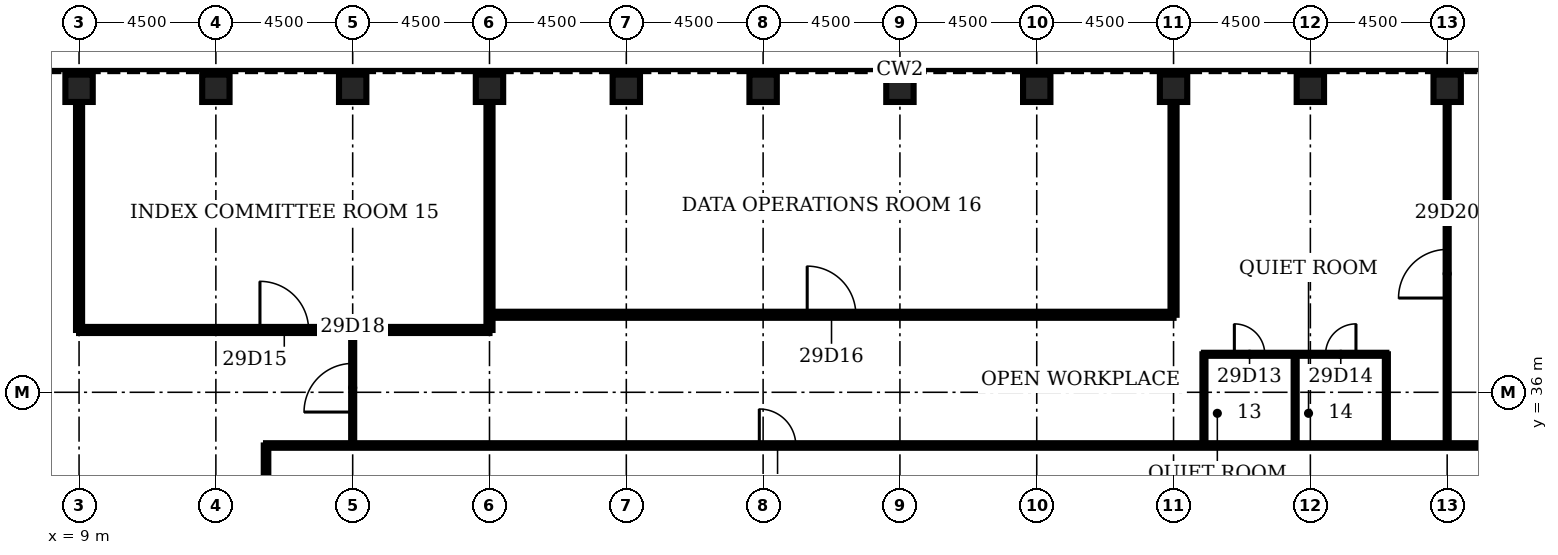
"""IFC4 building model, lengths in metres.
Left out: names, types, materials, properties, quantities, classifications, styles, units other than length and angle.
Written with IfcOpenShell. Run it as: python <this file> out.ifc"""

import sys

from ifc_helpers import new_model, si_unit, direction, frame, frame_2d, origin, origin_2d, place, context, subcontext, project, spatial, rectangle, hollow_rectangle, extrude, element, fill, save


model = new_model("IFC4")
c1 = context("Model", 3, precision=1e-05, world=origin(), true_north=direction((0.0, 1.0)))
c2 = subcontext(c1, "Body", "Model", "MODEL_VIEW")
j1 = project(units=[si_unit("LENGTHUNIT", "METRE"), si_unit("PLANEANGLEUNIT", "RADIAN")], contexts=[c1])
p1 = place(None, origin())
s1 = spatial("IfcSite", under=j1, at=p1, CompositionType="ELEMENT")
p2 = place(p1, origin())
s2 = spatial("IfcBuilding", under=s1, at=p2, CompositionType="ELEMENT")
p3 = place(p2, frame((0.0, 0.0, 134.1)))
s3 = spatial("IfcBuildingStorey", under=s2, at=p3, CompositionType="ELEMENT", Elevation=134.1)
for number, where, z_axis, x_axis in (
    (1, (54.0, 46.0, 0.0), (0.0, 0.0, 1.0), (0.0, 1.0, 0.0)),
    (2, (49.5, 46.0, 0.0), (0.0, 0.0, 1.0), (0.0, 1.0, 0.0)),
    (3, (45.0, 46.0, 0.0), (0.0, 0.0, 1.0), (0.0, 1.0, 0.0)),
    (4, (40.5, 46.0, 0.0), (0.0, 0.0, 1.0), (0.0, 1.0, 0.0)),
    (5, (36.0, 46.0, 0.0), (0.0, 0.0, 1.0), (0.0, 1.0, 0.0)),
    (6, (31.5, 46.0, 0.0), (0.0, 0.0, 1.0), (0.0, 1.0, 0.0)),
    (7, (27.0, 46.0, 0.0), (0.0, 0.0, 1.0), (0.0, 1.0, 0.0)),
    (8, (22.5, 46.0, 0.0), (0.0, 0.0, 1.0), (0.0, 1.0, 0.0)),
    (9, (18.0, 46.0, 0.0), (0.0, 0.0, 1.0), (0.0, 1.0, 0.0)),
    (10, (13.5, 46.0, 0.0), (0.0, 0.0, 1.0), (0.0, 1.0, 0.0)),
    (11, (9.0, 46.0, 0.0), (0.0, 0.0, 1.0), (0.0, 1.0, 0.0)),
):
    element("IfcColumn", number, at=place(p3, frame(where, z_axis=z_axis, x_axis=x_axis)), inside=s3, PredefinedType="COLUMN", context=c2, shape_type="SweptSolid", body=[
        extrude(hollow_rectangle(XDim=0.9, YDim=0.9, WallThickness=0.1, at=origin_2d()), origin(), (0.0, 0.0, 1.0), 4.2),
    ])
p4 = place(p3, frame((15.15, 34.25, 0.0), z_axis=(0.0, 0.0, 1.0), x_axis=(1.0, 0.0, 0.0)))
e12 = element("IfcWall", 12, at=p4, inside=s3, PredefinedType="PARTITIONING", context=c2, shape_type="SweptSolid", body=[
    extrude(rectangle(XDim=41.7, YDim=0.15, at=frame_2d((20.85, 0.0))), origin(), (0.0, 0.0, 1.0), 3.0),
])
p5 = place(p4, frame((16.225, 0.0, 0.0)))
e13 = element("IfcOpeningElement", 13, at=p5, cuts=e12, PredefinedType="OPENING", context=c2, shape_type="SweptSolid", body=[
    extrude(rectangle(XDim=1.2, YDim=2.1, at=frame_2d((0.6, 1.05))), frame((0.0, 0.085, 0.0), z_axis=(0.0, -1.0, 0.0), x_axis=(1.0, 0.0, 0.0)), (0.0, 0.0, 1.0), 0.17),
])
p6 = place(p3, frame((46.0, 37.25, 0.0), z_axis=(0.0, 0.0, 1.0), x_axis=(1.0, 0.0, 0.0)))
e14 = element("IfcWall", 14, at=p6, inside=s3, PredefinedType="PARTITIONING", context=c2, shape_type="SweptSolid", body=[
    extrude(rectangle(XDim=6.0, YDim=0.1, at=frame_2d((3.0, 0.0))), origin(), (0.0, 0.0, 1.0), 3.0),
])
p7 = place(p6, frame((1.0, 0.0, 0.0)))
e15 = element("IfcOpeningElement", 15, at=p7, cuts=e14, PredefinedType="OPENING", context=c2, shape_type="SweptSolid", body=[
    extrude(rectangle(XDim=1.0, YDim=2.1, at=frame_2d((0.5, 1.05))), frame((0.0, 0.06, 0.0), z_axis=(0.0, -1.0, 0.0), x_axis=(1.0, 0.0, 0.0)), (0.0, 0.0, 1.0), 0.12),
])
p8 = place(p6, frame((4.0, 0.0, 0.0)))
e16 = element("IfcOpeningElement", 16, at=p8, cuts=e14, PredefinedType="OPENING", context=c2, shape_type="SweptSolid", body=[
    extrude(rectangle(XDim=1.0, YDim=2.1, at=frame_2d((0.5, 1.05))), frame((0.0, 0.06, 0.0), z_axis=(0.0, -1.0, 0.0), x_axis=(1.0, 0.0, 0.0)), (0.0, 0.0, 1.0), 0.12),
])
p9 = place(p3, frame((9.0, 38.05, 0.0), z_axis=(0.0, 0.0, 1.0), x_axis=(1.0, 0.0, 0.0)))
e17 = element("IfcWall", 17, at=p9, inside=s3, PredefinedType="PARTITIONING", context=c2, shape_type="SweptSolid", body=[
    extrude(rectangle(XDim=13.5, YDim=0.2, at=frame_2d((6.75, 0.0))), origin(), (0.0, 0.0, 1.0), 3.0),
])
p10 = place(p9, frame((5.95, 0.0, 0.0)))
e18 = element("IfcOpeningElement", 18, at=p10, cuts=e17, PredefinedType="OPENING", context=c2, shape_type="SweptSolid", body=[
    extrude(rectangle(XDim=1.6, YDim=2.1, at=frame_2d((0.8, 1.05))), frame((0.0, 0.11, 0.0), z_axis=(0.0, -1.0, 0.0), x_axis=(1.0, 0.0, 0.0)), (0.0, 0.0, 1.0), 0.22),
])
p11 = place(p3, frame((22.5, 38.55, 0.0), z_axis=(0.0, 0.0, 1.0), x_axis=(1.0, 0.0, 0.0)))
e19 = element("IfcWall", 19, at=p11, inside=s3, PredefinedType="PARTITIONING", context=c2, shape_type="SweptSolid", body=[
    extrude(rectangle(XDim=22.5, YDim=0.2, at=frame_2d((11.25, 0.0))), origin(), (0.0, 0.0, 1.0), 3.0),
])
p12 = place(p11, frame((10.45, 0.0, 0.0)))
e20 = element("IfcOpeningElement", 20, at=p12, cuts=e19, PredefinedType="OPENING", context=c2, shape_type="SweptSolid", body=[
    extrude(rectangle(XDim=1.6, YDim=2.1, at=frame_2d((0.8, 1.05))), frame((0.0, 0.11, 0.0), z_axis=(0.0, -1.0, 0.0), x_axis=(1.0, 0.0, 0.0)), (0.0, 0.0, 1.0), 0.22),
])
p13 = place(p3, frame((9.0, 38.05, 0.0), z_axis=(0.0, 0.0, 1.0), x_axis=(0.0, 1.0, 0.0)))
e21 = element("IfcWall", 21, at=p13, inside=s3, PredefinedType="PARTITIONING", context=c2, shape_type="SweptSolid", body=[
    extrude(rectangle(XDim=7.5, YDim=0.2, at=frame_2d((3.75, 0.0))), origin(), (0.0, 0.0, 1.0), 3.0),
])
p14 = place(p3, frame((15.15, 13.75, 0.0), z_axis=(0.0, 0.0, 1.0), x_axis=(0.0, 1.0, 0.0)))
e22 = element("IfcWall", 22, at=p14, inside=s3, PredefinedType="PARTITIONING", context=c2, shape_type="SweptSolid", body=[
    extrude(rectangle(XDim=20.5, YDim=0.15, at=frame_2d((10.25, 0.0))), origin(), (0.0, 0.0, 1.0), 3.0),
])
p15 = place(p14, frame((9.65, 0.0, 0.0)))
e23 = element("IfcOpeningElement", 23, at=p15, cuts=e22, PredefinedType="OPENING", context=c2, shape_type="SweptSolid", body=[
    extrude(rectangle(XDim=1.2, YDim=2.1, at=frame_2d((0.6, 1.05))), frame((0.0, 0.085, 0.0), z_axis=(0.0, -1.0, 0.0), x_axis=(1.0, 0.0, 0.0)), (0.0, 0.0, 1.0), 0.17),
])
p16 = place(p3, frame((18.0, 34.25, 0.0), z_axis=(0.0, 0.0, 1.0), x_axis=(0.0, 1.0, 0.0)))
e24 = element("IfcWall", 24, at=p16, inside=s3, PredefinedType="PARTITIONING", context=c2, shape_type="SweptSolid", body=[
    extrude(rectangle(XDim=3.8, YDim=0.1, at=frame_2d((1.9, 0.0))), origin(), (0.0, 0.0, 1.0), 3.0),
])
p17 = place(p16, frame((1.1, 0.0, 0.0)))
e25 = element("IfcOpeningElement", 25, at=p17, cuts=e24, PredefinedType="OPENING", context=c2, shape_type="SweptSolid", body=[
    extrude(rectangle(XDim=1.6, YDim=2.1, at=frame_2d((0.8, 1.05))), frame((0.0, 0.06, 0.0), z_axis=(0.0, -1.0, 0.0), x_axis=(1.0, 0.0, 0.0)), (0.0, 0.0, 1.0), 0.12),
])
p18 = place(p3, frame((22.5, 38.05, 0.0), z_axis=(0.0, 0.0, 1.0), x_axis=(0.0, 1.0, 0.0)))
e26 = element("IfcWall", 26, at=p18, inside=s3, PredefinedType="PARTITIONING", context=c2, shape_type="SweptSolid", body=[
    extrude(rectangle(XDim=7.5, YDim=0.2, at=frame_2d((3.75, 0.0))), origin(), (0.0, 0.0, 1.0), 3.0),
])
p19 = place(p3, frame((45.0, 38.55, 0.0), z_axis=(0.0, 0.0, 1.0), x_axis=(0.0, 1.0, 0.0)))
e27 = element("IfcWall", 27, at=p19, inside=s3, PredefinedType="PARTITIONING", context=c2, shape_type="SweptSolid", body=[
    extrude(rectangle(XDim=7.0, YDim=0.2, at=frame_2d((3.5, 0.0))), origin(), (0.0, 0.0, 1.0), 3.0),
])
for number, where, z_axis, x_axis in (
    (28, (46.0, 34.25, 0.0), (0.0, 0.0, 1.0), (0.0, 1.0, 0.0)),
    (29, (49.0, 34.25, 0.0), (0.0, 0.0, 1.0), (0.0, 1.0, 0.0)),
    (30, (52.0, 34.25, 0.0), (0.0, 0.0, 1.0), (0.0, 1.0, 0.0)),
):
    element("IfcWall", number, at=place(p3, frame(where, z_axis=z_axis, x_axis=x_axis)), inside=s3, PredefinedType="PARTITIONING", context=c2, shape_type="SweptSolid", body=[
        extrude(rectangle(XDim=3.0, YDim=0.1, at=frame_2d((1.5, 0.0))), origin(), (0.0, 0.0, 1.0), 3.0),
    ])
p20 = place(p3, frame((54.0, 34.25, 0.0), z_axis=(0.0, 0.0, 1.0), x_axis=(0.0, 1.0, 0.0)))
e31 = element("IfcWall", 31, at=p20, inside=s3, PredefinedType="PARTITIONING", context=c2, shape_type="SweptSolid", body=[
    extrude(rectangle(XDim=11.3, YDim=0.1, at=frame_2d((5.65, 0.0))), origin(), (0.0, 0.0, 1.0), 3.0),
])
p21 = place(p20, frame((4.85, 0.0, 0.0)))
e32 = element("IfcOpeningElement", 32, at=p21, cuts=e31, PredefinedType="OPENING", context=c2, shape_type="SweptSolid", body=[
    extrude(rectangle(XDim=1.6, YDim=2.1, at=frame_2d((0.8, 1.05))), frame((0.0, 0.06, 0.0), z_axis=(0.0, -1.0, 0.0), x_axis=(1.0, 0.0, 0.0)), (0.0, 0.0, 1.0), 0.12),
])
p22 = place(p7, origin())
e33 = element("IfcDoor", 33, at=p22, inside=s3, OperationType="SINGLE_SWING_LEFT", PredefinedType="DOOR", context=c2, shape_type="SweptSolid", body=[
    extrude(rectangle(XDim=1.0, YDim=2.1, at=frame_2d((0.5, 1.05))), frame((0.0, 0.025, 0.0), z_axis=(0.0, -1.0, 0.0), x_axis=(1.0, 0.0, 0.0)), (0.0, 0.0, 1.0), 0.05),
])
fill(e15, e33)
p23 = place(p8, origin())
e34 = element("IfcDoor", 34, at=p23, inside=s3, OperationType="SINGLE_SWING_RIGHT", PredefinedType="DOOR", context=c2, shape_type="SweptSolid", body=[
    extrude(rectangle(XDim=1.0, YDim=2.1, at=frame_2d((0.5, 1.05))), frame((0.0, 0.025, 0.0), z_axis=(0.0, -1.0, 0.0), x_axis=(1.0, 0.0, 0.0)), (0.0, 0.0, 1.0), 0.05),
])
fill(e16, e34)
p24 = place(p10, origin())
e35 = element("IfcDoor", 35, at=p24, inside=s3, OperationType="SINGLE_SWING_LEFT", PredefinedType="DOOR", context=c2, shape_type="SweptSolid", body=[
    extrude(rectangle(XDim=1.6, YDim=2.1, at=frame_2d((0.8, 1.05))), frame((0.0, 0.025, 0.0), z_axis=(0.0, -1.0, 0.0), x_axis=(1.0, 0.0, 0.0)), (0.0, 0.0, 1.0), 0.05),
])
fill(e18, e35)
p25 = place(p12, origin())
e36 = element("IfcDoor", 36, at=p25, inside=s3, OperationType="SINGLE_SWING_LEFT", PredefinedType="DOOR", context=c2, shape_type="SweptSolid", body=[
    extrude(rectangle(XDim=1.6, YDim=2.1, at=frame_2d((0.8, 1.05))), frame((0.0, 0.025, 0.0), z_axis=(0.0, -1.0, 0.0), x_axis=(1.0, 0.0, 0.0)), (0.0, 0.0, 1.0), 0.05),
])
fill(e20, e36)
p26 = place(p17, origin())
e37 = element("IfcDoor", 37, at=p26, inside=s3, OperationType="SINGLE_SWING_LEFT", PredefinedType="DOOR", context=c2, shape_type="SweptSolid", body=[
    extrude(rectangle(XDim=1.6, YDim=2.1, at=frame_2d((0.8, 1.05))), frame((0.0, 0.025, 0.0), z_axis=(0.0, -1.0, 0.0), x_axis=(1.0, 0.0, 0.0)), (0.0, 0.0, 1.0), 0.05),
])
fill(e25, e37)
p27 = place(p21, origin())
e38 = element("IfcDoor", 38, at=p27, inside=s3, OperationType="SINGLE_SWING_LEFT", PredefinedType="DOOR", context=c2, shape_type="SweptSolid", body=[
    extrude(rectangle(XDim=1.6, YDim=2.1, at=frame_2d((0.8, 1.05))), frame((0.0, 0.025, 0.0), z_axis=(0.0, -1.0, 0.0), x_axis=(1.0, 0.0, 0.0)), (0.0, 0.0, 1.0), 0.05),
])
fill(e32, e38)
p28 = place(p5, origin())
e39 = element("IfcDoor", 39, at=p28, inside=s3, OperationType="SINGLE_SWING_LEFT", PredefinedType="DOOR", context=c2, shape_type="SweptSolid", body=[
    extrude(rectangle(XDim=1.2, YDim=2.1, at=frame_2d((0.6, 1.05))), frame((0.0, 0.025, 0.0), z_axis=(0.0, -1.0, 0.0), x_axis=(1.0, 0.0, 0.0)), (0.0, 0.0, 1.0), 0.05),
])
fill(e13, e39)
save(model, sys.argv[1])
